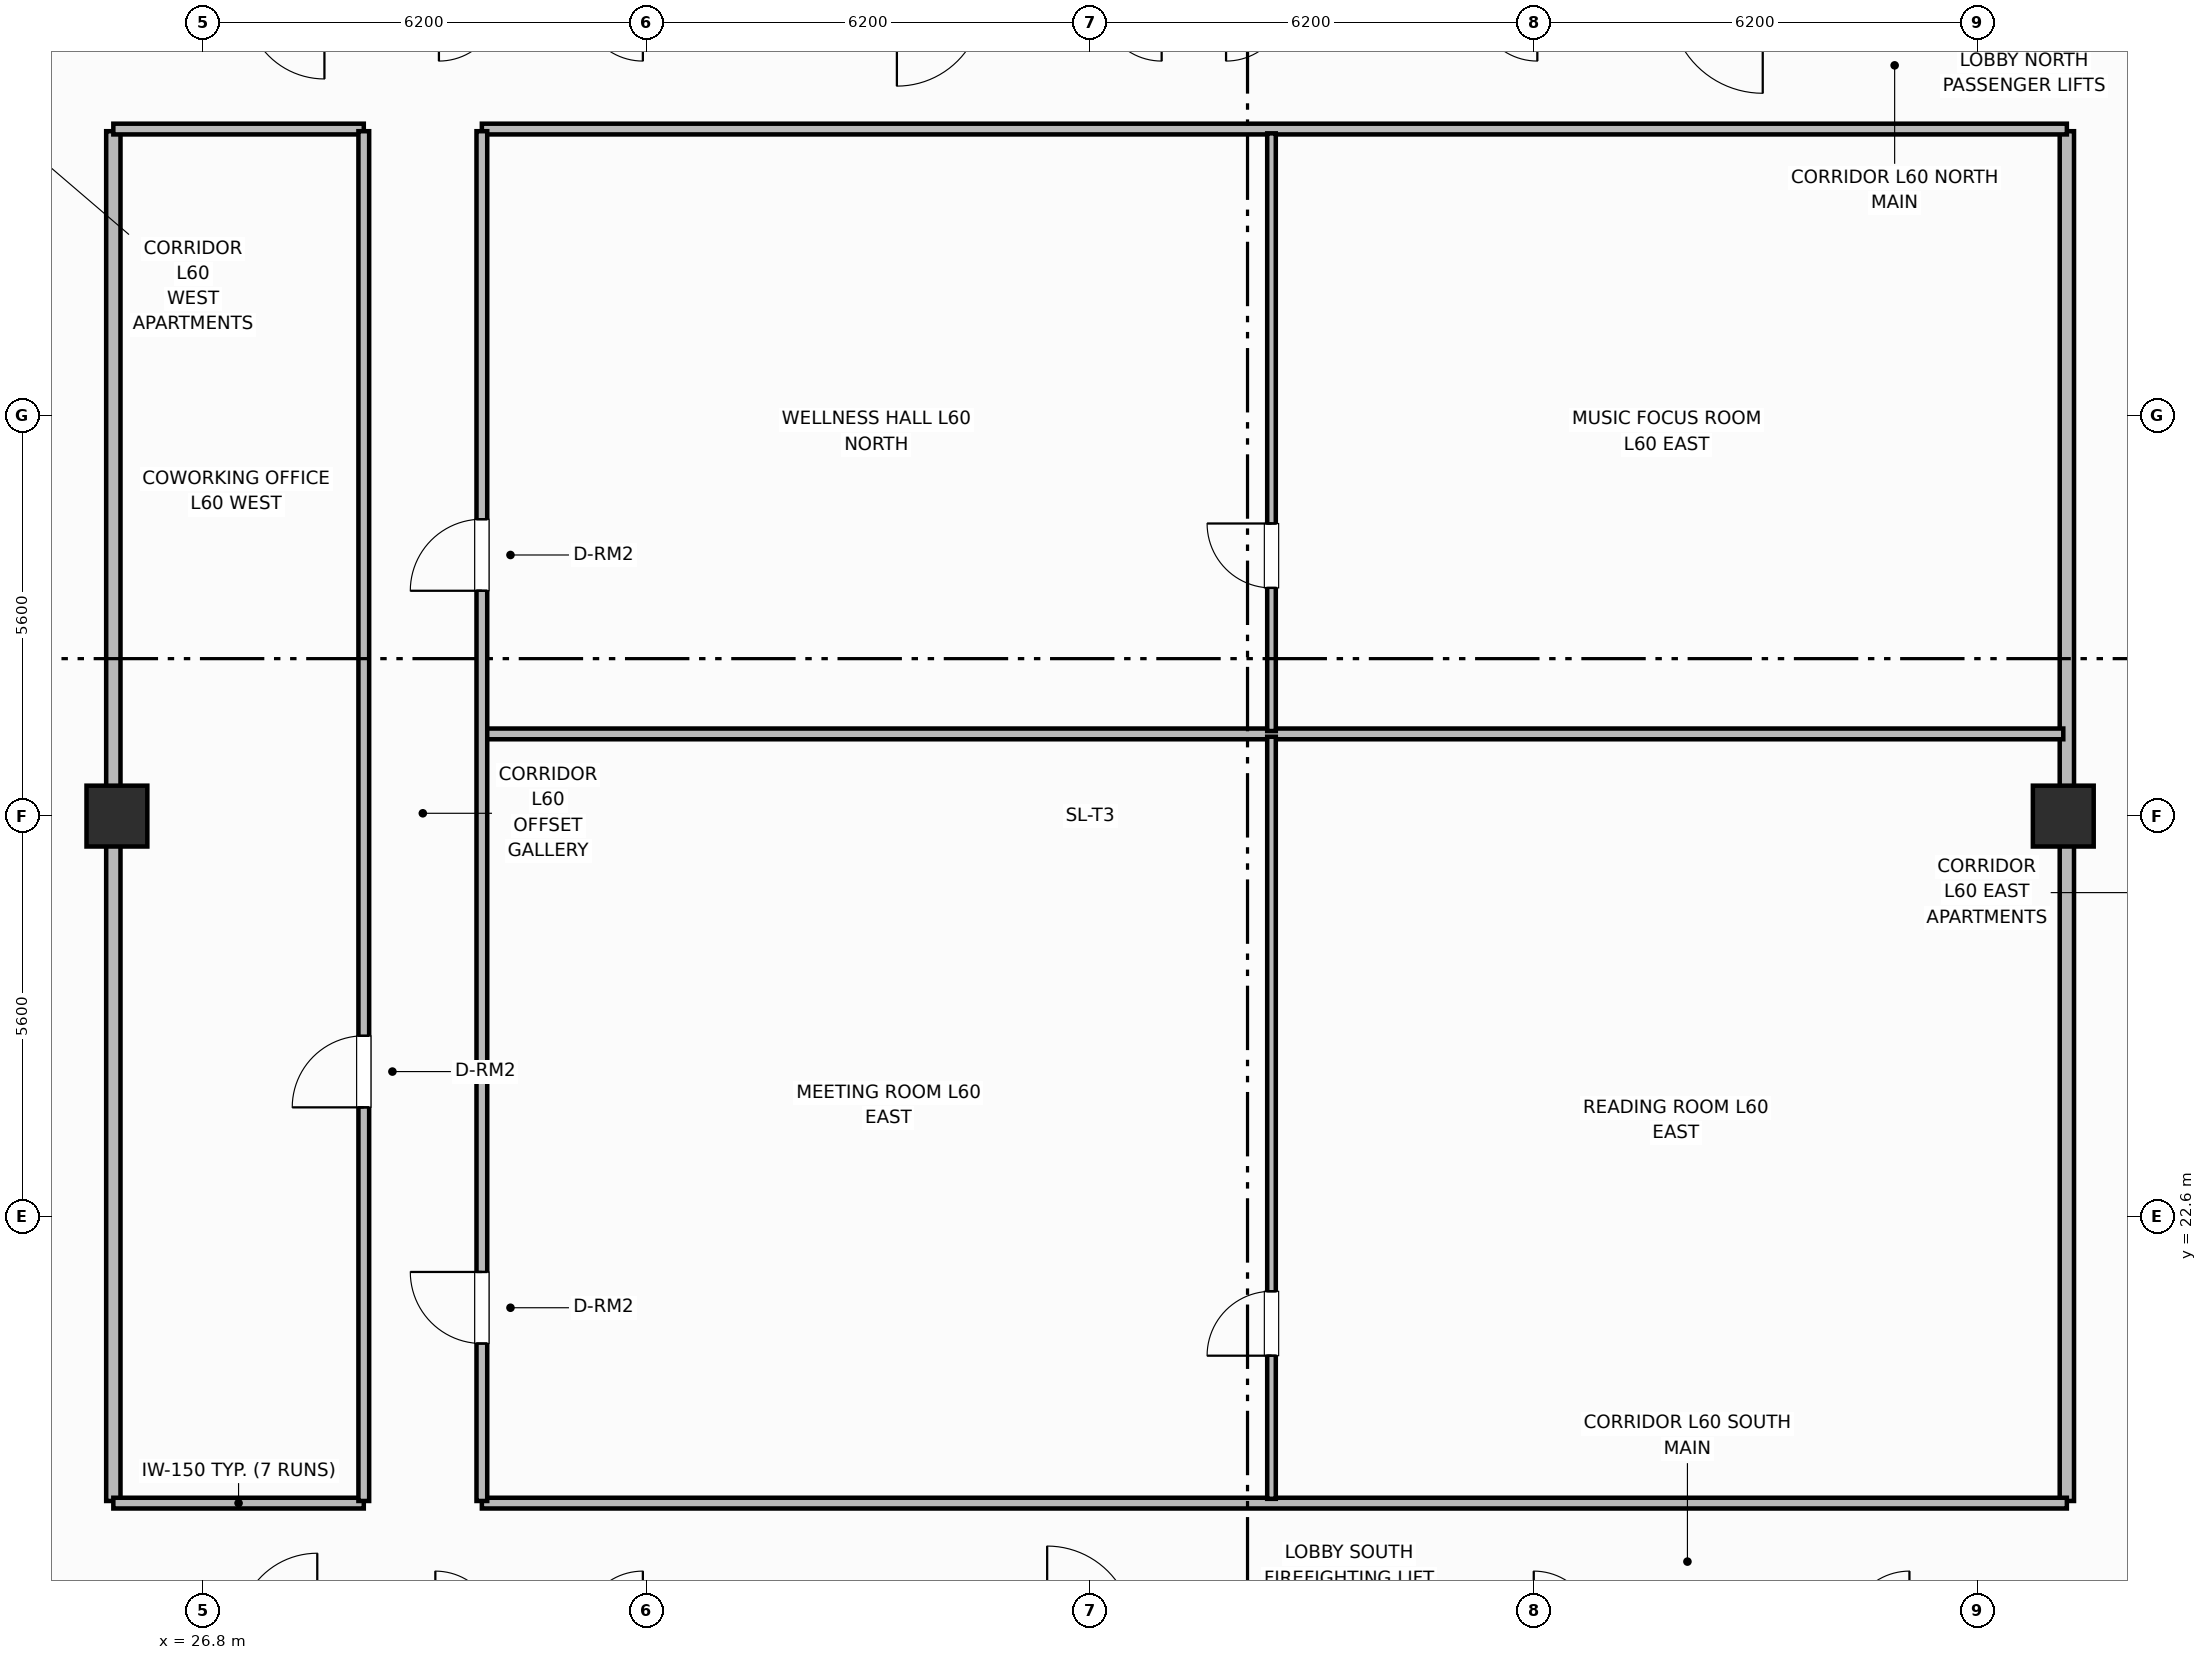
"""IFC4 building model, lengths in metres.
Left out: names, types, materials, properties, quantities, classifications, styles, units other than length and angle.
Written with IfcOpenShell. Run it as: python <this file> out.ifc"""

import sys

from ifc_helpers import new_model, si_unit, direction, frame, frame_2d, origin, origin_2d, place, context, subcontext, project, spatial, rectangle, extrude, element, fill, save


model = new_model("IFC4")
c1 = context("Model", 3, precision=1e-05, world=origin(), true_north=direction((0.0, 1.0)))
c2 = subcontext(c1, "Body", "Model", "MODEL_VIEW")
j1 = project(units=[si_unit("LENGTHUNIT", "METRE"), si_unit("PLANEANGLEUNIT", "RADIAN")], contexts=[c1])
p1 = place(None, origin())
s1 = spatial("IfcSite", under=j1, at=p1, CompositionType="ELEMENT")
p2 = place(p1, origin())
s2 = spatial("IfcBuilding", under=s1, at=p2, CompositionType="ELEMENT")
p3 = place(p2, frame((0.0, 0.0, 240.6)))
s3 = spatial("IfcBuildingStorey", under=s2, at=p3, CompositionType="ELEMENT", Elevation=240.6)
for number, where, z_axis, x_axis in (
    (1, (25.6, 28.2, 0.0), (0.0, 0.0, 1.0), (1.0, 0.0, 0.0)),
    (2, (52.8, 28.2, 0.0), (0.0, 0.0, 1.0), (1.0, 0.0, 0.0)),
):
    element("IfcColumn", number, at=place(p3, frame(where, z_axis=z_axis, x_axis=x_axis)), inside=s3, PredefinedType="COLUMN", context=c2, shape_type="SweptSolid", body=[
        extrude(rectangle(XDim=0.85, YDim=0.85, at=origin_2d()), origin(), (0.0, 0.0, 1.0), 3.7),
    ])
for number, where, z_axis, x_axis in (
    (3, (25.55, 18.63, 0.0), (0.0, 0.0, 1.0), (0.0, 1.0, 0.0)),
    (4, (52.85, 18.63, 0.0), (0.0, 0.0, 1.0), (0.0, 1.0, 0.0)),
):
    element("IfcWall", number, at=place(p3, frame(where, z_axis=z_axis, x_axis=x_axis)), inside=s3, PredefinedType="PARTITIONING", context=c2, shape_type="SweptSolid", body=[
        extrude(rectangle(XDim=19.14, YDim=0.2, at=frame_2d((9.57, 0.0))), origin(), (0.0, 0.0, 1.0), 2.56),
    ])
p4 = place(p3, frame((25.55, 18.6, 0.0), z_axis=(0.0, 0.0, 1.0), x_axis=(1.0, 0.0, 0.0)))
e5 = element("IfcWall", 5, at=p4, inside=s3, PredefinedType="PARTITIONING", context=c2, shape_type="SweptSolid", body=[
    extrude(rectangle(XDim=3.5, YDim=0.15, at=frame_2d((1.75, 0.0))), origin(), (0.0, 0.0, 1.0), 2.56),
])
p5 = place(p3, frame((30.7, 18.6, 0.0), z_axis=(0.0, 0.0, 1.0), x_axis=(1.0, 0.0, 0.0)))
e6 = element("IfcWall", 6, at=p5, inside=s3, PredefinedType="PARTITIONING", context=c2, shape_type="SweptSolid", body=[
    extrude(rectangle(XDim=22.15, YDim=0.15, at=frame_2d((11.075, 0.0))), origin(), (0.0, 0.0, 1.0), 2.56),
])
p6 = place(p3, frame((25.55, 37.8, 0.0), z_axis=(0.0, 0.0, 1.0), x_axis=(1.0, 0.0, 0.0)))
e7 = element("IfcWall", 7, at=p6, inside=s3, PredefinedType="PARTITIONING", context=c2, shape_type="SweptSolid", body=[
    extrude(rectangle(XDim=3.5, YDim=0.15, at=frame_2d((1.75, 0.0))), origin(), (0.0, 0.0, 1.0), 2.56),
])
p7 = place(p3, frame((30.7, 37.8, 0.0), z_axis=(0.0, 0.0, 1.0), x_axis=(1.0, 0.0, 0.0)))
e8 = element("IfcWall", 8, at=p7, inside=s3, PredefinedType="PARTITIONING", context=c2, shape_type="SweptSolid", body=[
    extrude(rectangle(XDim=22.15, YDim=0.15, at=frame_2d((11.075, 0.0))), origin(), (0.0, 0.0, 1.0), 2.56),
])
p8 = place(p3, frame((30.73, 29.348, 0.0), z_axis=(0.0, 0.0, 1.0), x_axis=(1.0, 0.0, 0.0)))
e9 = element("IfcWall", 9, at=p8, inside=s3, PredefinedType="PARTITIONING", context=c2, shape_type="SweptSolid", body=[
    extrude(rectangle(XDim=22.07, YDim=0.15, at=frame_2d((11.035, 0.0))), origin(), (0.0, 0.0, 1.0), 2.56),
])
p9 = place(p3, frame((41.735, 18.66, 0.0), z_axis=(0.0, 0.0, 1.0), x_axis=(0.0, 1.0, 0.0)))
e10 = element("IfcWall", 10, at=p9, inside=s3, PredefinedType="PARTITIONING", context=c2, shape_type="SweptSolid", body=[
    extrude(rectangle(XDim=10.648, YDim=0.12, at=frame_2d((5.324, 0.0))), origin(), (0.0, 0.0, 1.0), 2.56),
])
p10 = place(p9, frame((2.0, 0.0, 0.0)))
e11 = element("IfcOpeningElement", 11, at=p10, cuts=e10, PredefinedType="OPENING", context=c2, shape_type="SweptSolid", body=[
    extrude(rectangle(XDim=0.9, YDim=2.1, at=frame_2d((0.45, 1.05))), frame((0.0, 0.07, 0.0), z_axis=(0.0, -1.0, 0.0), x_axis=(1.0, 0.0, 0.0)), (0.0, 0.0, 1.0), 0.14),
])
p11 = place(p3, frame((41.735, 29.388, 0.0), z_axis=(0.0, 0.0, 1.0), x_axis=(0.0, 1.0, 0.0)))
e12 = element("IfcWall", 12, at=p11, inside=s3, PredefinedType="PARTITIONING", context=c2, shape_type="SweptSolid", body=[
    extrude(rectangle(XDim=8.352, YDim=0.12, at=frame_2d((4.176, 0.0))), origin(), (0.0, 0.0, 1.0), 2.56),
])
p12 = place(p11, frame((2.0, 0.0, 0.0)))
e13 = element("IfcOpeningElement", 13, at=p12, cuts=e12, PredefinedType="OPENING", context=c2, shape_type="SweptSolid", body=[
    extrude(rectangle(XDim=0.9, YDim=2.1, at=frame_2d((0.45, 1.05))), frame((0.0, 0.07, 0.0), z_axis=(0.0, -1.0, 0.0), x_axis=(1.0, 0.0, 0.0)), (0.0, 0.0, 1.0), 0.14),
])
p13 = place(p3, frame((29.05, 18.63, 0.0), z_axis=(0.0, 0.0, 1.0), x_axis=(0.0, 1.0, 0.0)))
e14 = element("IfcWall", 14, at=p13, inside=s3, PredefinedType="PARTITIONING", context=c2, shape_type="SweptSolid", body=[
    extrude(rectangle(XDim=19.14, YDim=0.15, at=frame_2d((9.57, 0.0))), origin(), (0.0, 0.0, 1.0), 2.56),
])
p14 = place(p13, frame((5.5, 0.0, 0.0)))
e15 = element("IfcOpeningElement", 15, at=p14, cuts=e14, PredefinedType="OPENING", context=c2, shape_type="SweptSolid", body=[
    extrude(rectangle(XDim=1.0, YDim=2.15, at=frame_2d((0.5, 1.075))), frame((0.0, 0.085, 0.0), z_axis=(0.0, -1.0, 0.0), x_axis=(1.0, 0.0, 0.0)), (0.0, 0.0, 1.0), 0.17),
])
p15 = place(p3, frame((30.7, 18.63, 0.0), z_axis=(0.0, 0.0, 1.0), x_axis=(0.0, 1.0, 0.0)))
e16 = element("IfcWall", 16, at=p15, inside=s3, PredefinedType="PARTITIONING", context=c2, shape_type="SweptSolid", body=[
    extrude(rectangle(XDim=19.14, YDim=0.15, at=frame_2d((9.57, 0.0))), origin(), (0.0, 0.0, 1.0), 2.56),
])
p16 = place(p15, frame((2.2, 0.0, 0.0)))
e17 = element("IfcOpeningElement", 17, at=p16, cuts=e16, PredefinedType="OPENING", context=c2, shape_type="SweptSolid", body=[
    extrude(rectangle(XDim=1.0, YDim=2.15, at=frame_2d((0.5, 1.075))), frame((0.0, 0.085, 0.0), z_axis=(0.0, -1.0, 0.0), x_axis=(1.0, 0.0, 0.0)), (0.0, 0.0, 1.0), 0.17),
])
p17 = place(p15, frame((12.719, 0.0, 0.0)))
e18 = element("IfcOpeningElement", 18, at=p17, cuts=e16, PredefinedType="OPENING", context=c2, shape_type="SweptSolid", body=[
    extrude(rectangle(XDim=1.0, YDim=2.15, at=frame_2d((0.5, 1.075))), frame((0.0, 0.085, 0.0), z_axis=(0.0, -1.0, 0.0), x_axis=(1.0, 0.0, 0.0)), (0.0, 0.0, 1.0), 0.17),
])
p18 = place(p10, origin())
e19 = element("IfcDoor", 19, at=p18, inside=s3, OperationType="SINGLE_SWING_LEFT", PredefinedType="DOOR", context=c2, shape_type="SweptSolid", body=[
    extrude(rectangle(XDim=0.9, YDim=2.1, at=frame_2d((0.45, 1.05))), frame((0.0, 0.025, 0.0), z_axis=(0.0, -1.0, 0.0), x_axis=(1.0, 0.0, 0.0)), (0.0, 0.0, 1.0), 0.05),
])
fill(e11, e19)
p19 = place(p12, origin())
e20 = element("IfcDoor", 20, at=p19, inside=s3, OperationType="SINGLE_SWING_RIGHT", PredefinedType="DOOR", context=c2, shape_type="SweptSolid", body=[
    extrude(rectangle(XDim=0.9, YDim=2.1, at=frame_2d((0.45, 1.05))), frame((0.0, 0.025, 0.0), z_axis=(0.0, -1.0, 0.0), x_axis=(1.0, 0.0, 0.0)), (0.0, 0.0, 1.0), 0.05),
])
fill(e13, e20)
p20 = place(p14, origin())
e21 = element("IfcDoor", 21, at=p20, inside=s3, OperationType="SINGLE_SWING_LEFT", PredefinedType="DOOR", context=c2, shape_type="SweptSolid", body=[
    extrude(rectangle(XDim=1.0, YDim=2.15, at=frame_2d((0.5, 1.075))), frame((0.0, 0.025, 0.0), z_axis=(0.0, -1.0, 0.0), x_axis=(1.0, 0.0, 0.0)), (0.0, 0.0, 1.0), 0.05),
])
fill(e15, e21)
p21 = place(p16, origin())
e22 = element("IfcDoor", 22, at=p21, inside=s3, OperationType="SINGLE_SWING_RIGHT", PredefinedType="DOOR", context=c2, shape_type="SweptSolid", body=[
    extrude(rectangle(XDim=1.0, YDim=2.15, at=frame_2d((0.5, 1.075))), frame((0.0, 0.025, 0.0), z_axis=(0.0, -1.0, 0.0), x_axis=(1.0, 0.0, 0.0)), (0.0, 0.0, 1.0), 0.05),
])
fill(e17, e22)
p22 = place(p17, origin())
e23 = element("IfcDoor", 23, at=p22, inside=s3, OperationType="SINGLE_SWING_LEFT", PredefinedType="DOOR", context=c2, shape_type="SweptSolid", body=[
    extrude(rectangle(XDim=1.0, YDim=2.15, at=frame_2d((0.5, 1.075))), frame((0.0, 0.025, 0.0), z_axis=(0.0, -1.0, 0.0), x_axis=(1.0, 0.0, 0.0)), (0.0, 0.0, 1.0), 0.05),
])
fill(e18, e23)
save(model, sys.argv[1])
